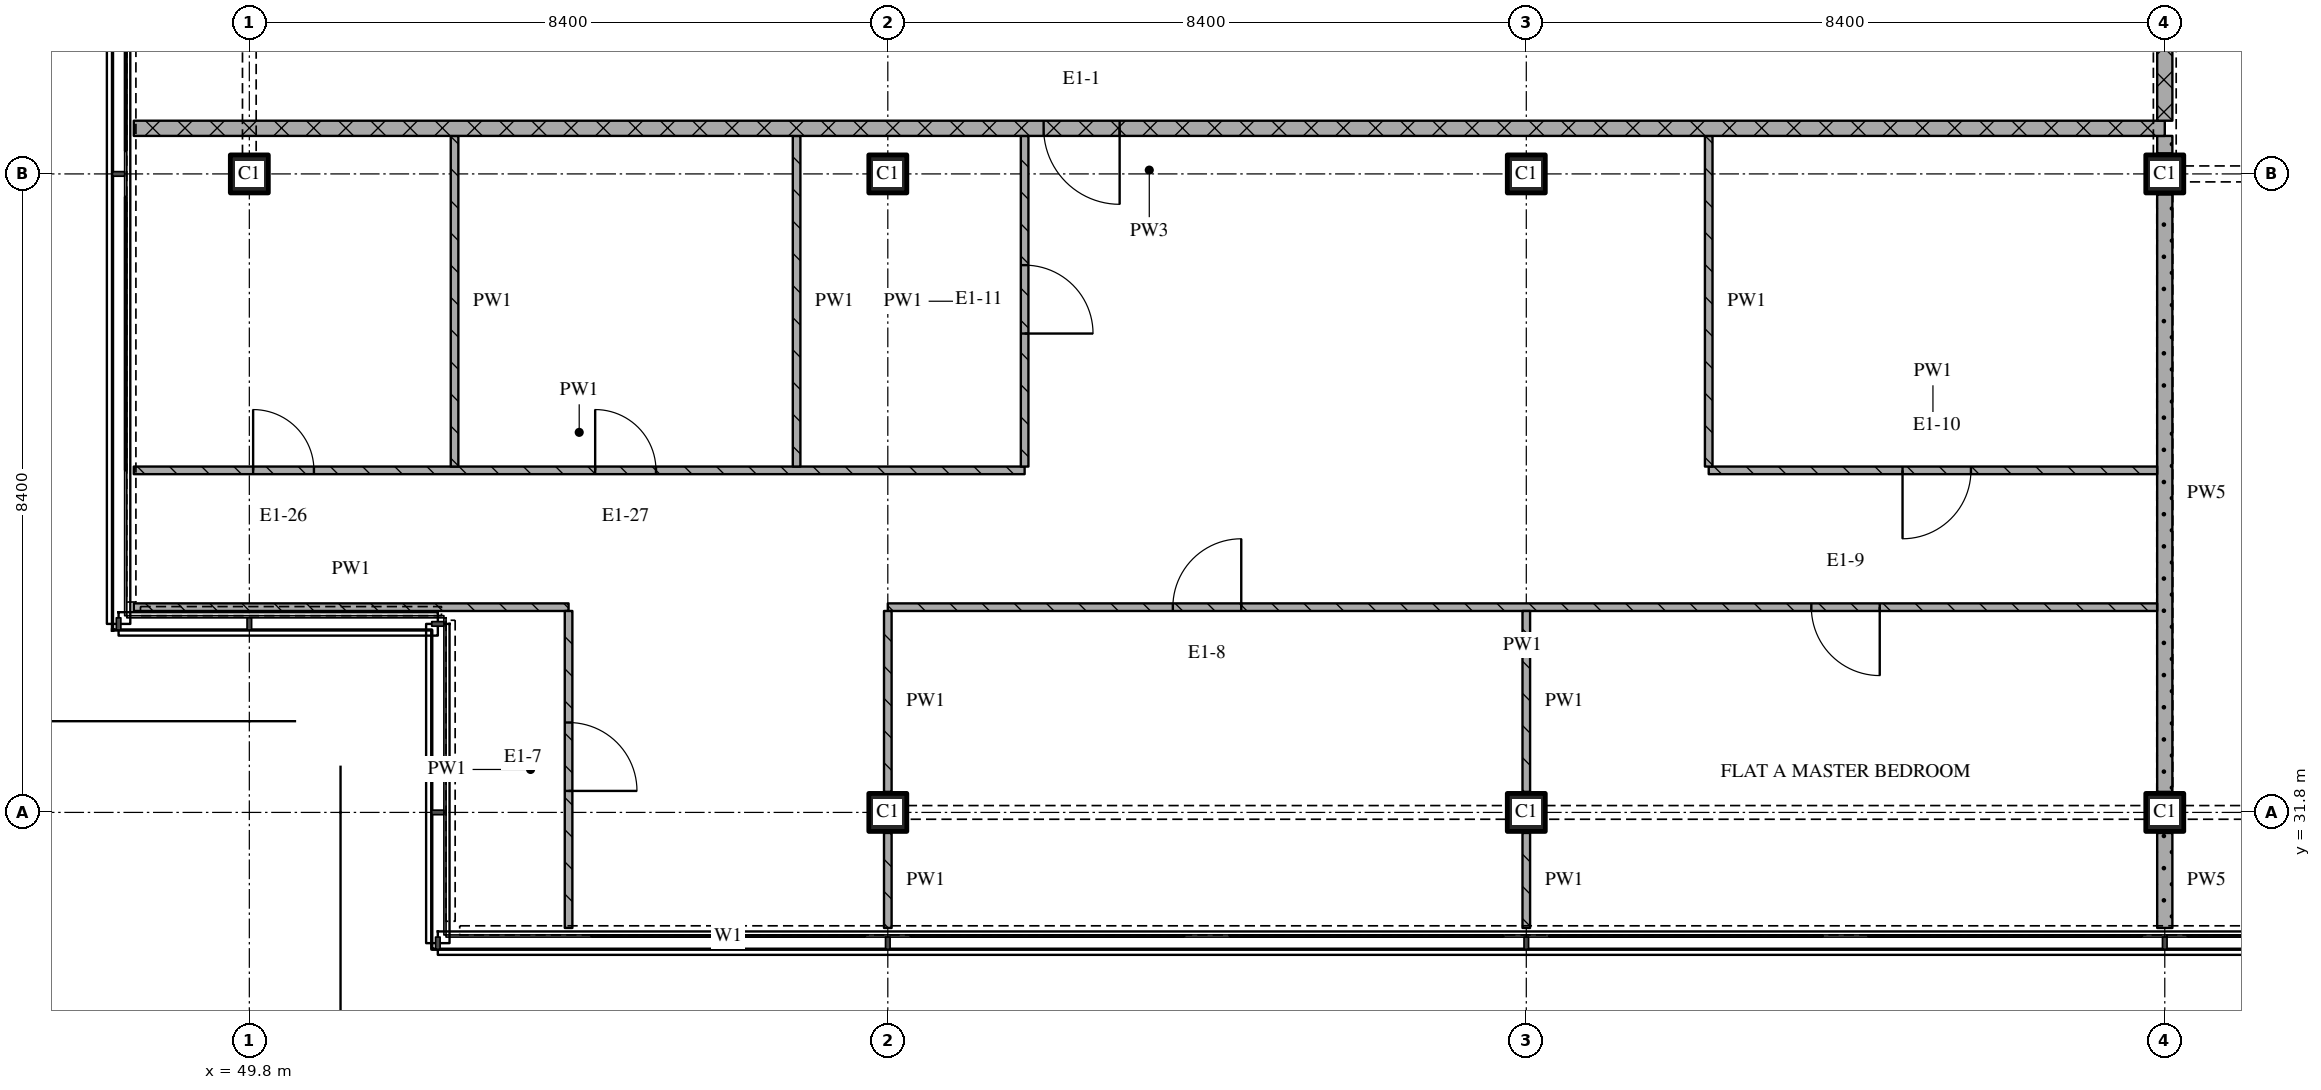
"""IFC4 building model, lengths in metres.
Left out: names, types, materials, properties, quantities, classifications, styles, units other than length and angle.
Written with IfcOpenShell. Run it as: python <this file> out.ifc"""

import sys

from ifc_helpers import new_model, si_unit, direction, frame, frame_2d, origin, origin_2d, place, context, subcontext, project, spatial, rectangle, extrude, element, fill, save


model = new_model("IFC4")
c1 = context("Model", 3, precision=1e-05, world=origin(), true_north=direction((0.0, 1.0)))
c2 = subcontext(c1, "Body", "Model", "MODEL_VIEW")
j1 = project(units=[si_unit("LENGTHUNIT", "METRE"), si_unit("PLANEANGLEUNIT", "RADIAN")], contexts=[c1])
p1 = place(None, origin())
s1 = spatial("IfcSite", under=j1, at=p1, CompositionType="ELEMENT")
p2 = place(p1, origin())
s2 = spatial("IfcBuilding", under=s1, at=p2, CompositionType="ELEMENT")
p3 = place(p2, frame((0.0, 0.0, 267.15)))
s3 = spatial("IfcBuildingStorey", under=s2, at=p3, CompositionType="ELEMENT", Elevation=267.15)
for number, where, z_axis, x_axis in (
    (1, (49.8, 40.2, 0.0), (0.0, 0.0, 1.0), (1.0, 0.0, 0.0)),
    (2, (58.2, 31.8, 0.0), (0.0, 0.0, 1.0), (1.0, 0.0, 0.0)),
    (3, (58.2, 40.2, 0.0), (0.0, 0.0, 1.0), (1.0, 0.0, 0.0)),
    (4, (66.6, 31.8, 0.0), (0.0, 0.0, 1.0), (1.0, 0.0, 0.0)),
    (5, (66.6, 40.2, 0.0), (0.0, 0.0, 1.0), (1.0, 0.0, 0.0)),
    (6, (75.0, 31.8, 0.0), (0.0, 0.0, 1.0), (1.0, 0.0, 0.0)),
    (7, (75.0, 40.2, 0.0), (0.0, 0.0, 1.0), (1.0, 0.0, 0.0)),
):
    element("IfcColumn", number, at=place(p3, frame(where, z_axis=z_axis, x_axis=x_axis)), inside=s3, PredefinedType="COLUMN", context=c2, shape_type="SweptSolid", body=[
        extrude(rectangle(XDim=0.5, YDim=0.5, at=origin_2d()), origin(), (0.0, 0.0, 1.0), 3.6),
    ])
p4 = place(p3, frame((48.28, 34.5, 0.0), z_axis=(0.0, 0.0, 1.0), x_axis=(1.0, 0.0, 0.0)))
e8 = element("IfcWall", 8, at=p4, inside=s3, PredefinedType="PARTITIONING", context=c2, shape_type="SweptSolid", body=[
    extrude(rectangle(XDim=5.72, YDim=0.1, at=frame_2d((2.86, 0.0))), origin(), (0.0, 0.0, 1.0), 3.32),
])
p5 = place(p3, frame((74.9, 34.5, 0.0), z_axis=(0.0, 0.0, 1.0), x_axis=(-1.0, 0.0, 0.0)))
e9 = element("IfcWall", 9, at=p5, inside=s3, PredefinedType="PARTITIONING", context=c2, shape_type="SweptSolid", body=[
    extrude(rectangle(XDim=16.7, YDim=0.1, at=frame_2d((8.35, 0.0))), origin(), (0.0, 0.0, 1.0), 3.32),
])
p6 = place(p5, frame((3.65, 0.0, 0.0)))
e10 = element("IfcOpeningElement", 10, at=p6, cuts=e9, PredefinedType="OPENING", context=c2, shape_type="SweptSolid", body=[
    extrude(rectangle(XDim=0.9, YDim=2.1, at=frame_2d((0.45, 1.05))), frame((0.0, 0.06, 0.0), z_axis=(0.0, -1.0, 0.0), x_axis=(1.0, 0.0, 0.0)), (0.0, 0.0, 1.0), 0.12),
])
p7 = place(p5, frame((12.05, 0.0, 0.0)))
e11 = element("IfcOpeningElement", 11, at=p7, cuts=e9, PredefinedType="OPENING", context=c2, shape_type="SweptSolid", body=[
    extrude(rectangle(XDim=0.9, YDim=2.1, at=frame_2d((0.45, 1.05))), frame((0.0, 0.06, 0.0), z_axis=(0.0, -1.0, 0.0), x_axis=(1.0, 0.0, 0.0)), (0.0, 0.0, 1.0), 0.12),
])
p8 = place(p3, frame((48.28, 36.3, 0.0), z_axis=(0.0, 0.0, 1.0), x_axis=(1.0, 0.0, 0.0)))
e12 = element("IfcWall", 12, at=p8, inside=s3, PredefinedType="PARTITIONING", context=c2, shape_type="SweptSolid", body=[
    extrude(rectangle(XDim=11.72, YDim=0.1, at=frame_2d((5.86, 0.0))), origin(), (0.0, 0.0, 1.0), 3.32),
])
p9 = place(p8, frame((1.57, 0.0, 0.0)))
e13 = element("IfcOpeningElement", 13, at=p9, cuts=e12, PredefinedType="OPENING", context=c2, shape_type="SweptSolid", body=[
    extrude(rectangle(XDim=0.8, YDim=2.1, at=frame_2d((0.4, 1.05))), frame((0.0, 0.06, 0.0), z_axis=(0.0, -1.0, 0.0), x_axis=(1.0, 0.0, 0.0)), (0.0, 0.0, 1.0), 0.12),
])
p10 = place(p8, frame((6.07, 0.0, 0.0)))
e14 = element("IfcOpeningElement", 14, at=p10, cuts=e12, PredefinedType="OPENING", context=c2, shape_type="SweptSolid", body=[
    extrude(rectangle(XDim=0.8, YDim=2.1, at=frame_2d((0.4, 1.05))), frame((0.0, 0.06, 0.0), z_axis=(0.0, -1.0, 0.0), x_axis=(1.0, 0.0, 0.0)), (0.0, 0.0, 1.0), 0.12),
])
p11 = place(p3, frame((69.0, 36.3, 0.0), z_axis=(0.0, 0.0, 1.0), x_axis=(1.0, 0.0, 0.0)))
e15 = element("IfcWall", 15, at=p11, inside=s3, PredefinedType="PARTITIONING", context=c2, shape_type="SweptSolid", body=[
    extrude(rectangle(XDim=5.9, YDim=0.1, at=frame_2d((2.95, 0.0))), origin(), (0.0, 0.0, 1.0), 3.32),
])
p12 = place(p11, frame((2.55, 0.0, 0.0)))
e16 = element("IfcOpeningElement", 16, at=p12, cuts=e15, PredefinedType="OPENING", context=c2, shape_type="SweptSolid", body=[
    extrude(rectangle(XDim=0.9, YDim=2.1, at=frame_2d((0.45, 1.05))), frame((0.0, 0.06, 0.0), z_axis=(0.0, -1.0, 0.0), x_axis=(1.0, 0.0, 0.0)), (0.0, 0.0, 1.0), 0.12),
])
p13 = place(p3, frame((75.0, 40.8, 0.0), z_axis=(0.0, 0.0, 1.0), x_axis=(-1.0, 0.0, 0.0)))
e17 = element("IfcWall", 17, at=p13, inside=s3, PredefinedType="PARTITIONING", context=c2, shape_type="SweptSolid", body=[
    extrude(rectangle(XDim=26.72, YDim=0.2, at=frame_2d((13.36, 0.0))), origin(), (0.0, 0.0, 1.0), 3.32),
])
p14 = place(p13, frame((13.75, 0.0, 0.0)))
e18 = element("IfcOpeningElement", 18, at=p14, cuts=e17, PredefinedType="OPENING", context=c2, shape_type="SweptSolid", body=[
    extrude(rectangle(XDim=1.0, YDim=2.1, at=frame_2d((0.5, 1.05))), frame((0.0, 0.11, 0.0), z_axis=(0.0, -1.0, 0.0), x_axis=(1.0, 0.0, 0.0)), (0.0, 0.0, 1.0), 0.22),
])
p15 = place(p3, frame((52.5, 40.7, 0.0), z_axis=(0.0, 0.0, 1.0), x_axis=(0.0, -1.0, 0.0)))
e19 = element("IfcWall", 19, at=p15, inside=s3, PredefinedType="PARTITIONING", context=c2, shape_type="SweptSolid", body=[
    extrude(rectangle(XDim=4.35, YDim=0.1, at=frame_2d((2.175, 0.0))), origin(), (0.0, 0.0, 1.0), 3.32),
])
p16 = place(p3, frame((54.0, 30.28, 0.0), z_axis=(0.0, 0.0, 1.0), x_axis=(0.0, 1.0, 0.0)))
e20 = element("IfcWall", 20, at=p16, inside=s3, PredefinedType="PARTITIONING", context=c2, shape_type="SweptSolid", body=[
    extrude(rectangle(XDim=4.17, YDim=0.1, at=frame_2d((2.085, 0.0))), origin(), (0.0, 0.0, 1.0), 3.32),
])
p17 = place(p16, frame((1.803, 0.0, 0.0)))
e21 = element("IfcOpeningElement", 21, at=p17, cuts=e20, PredefinedType="OPENING", context=c2, shape_type="SweptSolid", body=[
    extrude(rectangle(XDim=0.9, YDim=2.1, at=frame_2d((0.45, 1.05))), frame((0.0, 0.06, 0.0), z_axis=(0.0, -1.0, 0.0), x_axis=(1.0, 0.0, 0.0)), (0.0, 0.0, 1.0), 0.12),
])
p18 = place(p3, frame((57.0, 40.7, 0.0), z_axis=(0.0, 0.0, 1.0), x_axis=(0.0, -1.0, 0.0)))
e22 = element("IfcWall", 22, at=p18, inside=s3, PredefinedType="PARTITIONING", context=c2, shape_type="SweptSolid", body=[
    extrude(rectangle(XDim=4.35, YDim=0.1, at=frame_2d((2.175, 0.0))), origin(), (0.0, 0.0, 1.0), 3.32),
])
p19 = place(p3, frame((58.2, 31.53, 0.0), z_axis=(0.0, 0.0, 1.0), x_axis=(0.0, -1.0, 0.0)))
e23 = element("IfcWall", 23, at=p19, inside=s3, PredefinedType="PARTITIONING", context=c2, shape_type="SweptSolid", body=[
    extrude(rectangle(XDim=1.25, YDim=0.1, at=frame_2d((0.625, 0.0))), origin(), (0.0, 0.0, 1.0), 3.32),
])
p20 = place(p3, frame((58.2, 34.45, 0.0), z_axis=(0.0, 0.0, 1.0), x_axis=(0.0, -1.0, 0.0)))
e24 = element("IfcWall", 24, at=p20, inside=s3, PredefinedType="PARTITIONING", context=c2, shape_type="SweptSolid", body=[
    extrude(rectangle(XDim=2.38, YDim=0.1, at=frame_2d((1.19, 0.0))), origin(), (0.0, 0.0, 1.0), 2.83),
])
p21 = place(p3, frame((60.0, 36.35, 0.0), z_axis=(0.0, 0.0, 1.0), x_axis=(0.0, 1.0, 0.0)))
e25 = element("IfcWall", 25, at=p21, inside=s3, PredefinedType="PARTITIONING", context=c2, shape_type="SweptSolid", body=[
    extrude(rectangle(XDim=4.35, YDim=0.1, at=frame_2d((2.175, 0.0))), origin(), (0.0, 0.0, 1.0), 3.32),
])
p22 = place(p21, frame((1.75, 0.0, 0.0)))
e26 = element("IfcOpeningElement", 26, at=p22, cuts=e25, PredefinedType="OPENING", context=c2, shape_type="SweptSolid", body=[
    extrude(rectangle(XDim=0.9, YDim=2.1, at=frame_2d((0.45, 1.05))), frame((0.0, 0.06, 0.0), z_axis=(0.0, -1.0, 0.0), x_axis=(1.0, 0.0, 0.0)), (0.0, 0.0, 1.0), 0.12),
])
p23 = place(p3, frame((66.6, 31.53, 0.0), z_axis=(0.0, 0.0, 1.0), x_axis=(0.0, -1.0, 0.0)))
e27 = element("IfcWall", 27, at=p23, inside=s3, PredefinedType="PARTITIONING", context=c2, shape_type="SweptSolid", body=[
    extrude(rectangle(XDim=1.25, YDim=0.1, at=frame_2d((0.625, 0.0))), origin(), (0.0, 0.0, 1.0), 3.32),
])
p24 = place(p3, frame((66.6, 34.45, 0.0), z_axis=(0.0, 0.0, 1.0), x_axis=(0.0, -1.0, 0.0)))
e28 = element("IfcWall", 28, at=p24, inside=s3, PredefinedType="PARTITIONING", context=c2, shape_type="SweptSolid", body=[
    extrude(rectangle(XDim=2.38, YDim=0.1, at=frame_2d((1.19, 0.0))), origin(), (0.0, 0.0, 1.0), 3.32),
])
p25 = place(p3, frame((69.0, 40.7, 0.0), z_axis=(0.0, 0.0, 1.0), x_axis=(0.0, -1.0, 0.0)))
e29 = element("IfcWall", 29, at=p25, inside=s3, PredefinedType="PARTITIONING", context=c2, shape_type="SweptSolid", body=[
    extrude(rectangle(XDim=4.35, YDim=0.1, at=frame_2d((2.175, 0.0))), origin(), (0.0, 0.0, 1.0), 3.32),
])
p26 = place(p3, frame((75.0, 43.1, 0.0), z_axis=(0.0, 0.0, 1.0), x_axis=(0.0, -1.0, 0.0)))
e30 = element("IfcWall", 30, at=p26, inside=s3, PredefinedType="PARTITIONING", context=c2, shape_type="SweptSolid", body=[
    extrude(rectangle(XDim=2.2, YDim=0.2, at=frame_2d((1.1, 0.0))), origin(), (0.0, 0.0, 1.0), 2.53),
])
p27 = place(p3, frame((75.0, 31.53, 0.0), z_axis=(0.0, 0.0, 1.0), x_axis=(0.0, -1.0, 0.0)))
e31 = element("IfcWall", 31, at=p27, inside=s3, PredefinedType="PARTITIONING", context=c2, shape_type="SweptSolid", body=[
    extrude(rectangle(XDim=1.25, YDim=0.2, at=frame_2d((0.625, 0.0))), origin(), (0.0, 0.0, 1.0), 3.32),
])
p28 = place(p3, frame((75.0, 39.93, 0.0), z_axis=(0.0, 0.0, 1.0), x_axis=(0.0, -1.0, 0.0)))
e32 = element("IfcWall", 32, at=p28, inside=s3, PredefinedType="PARTITIONING", context=c2, shape_type="SweptSolid", body=[
    extrude(rectangle(XDim=7.86, YDim=0.2, at=frame_2d((3.93, 0.0))), origin(), (0.0, 0.0, 1.0), 2.77),
])
p29 = place(p3, frame((75.0, 40.7, 0.0), z_axis=(0.0, 0.0, 1.0), x_axis=(0.0, -1.0, 0.0)))
e33 = element("IfcWall", 33, at=p29, inside=s3, PredefinedType="PARTITIONING", context=c2, shape_type="SweptSolid", body=[
    extrude(rectangle(XDim=0.23, YDim=0.2, at=frame_2d((0.115, 0.0))), origin(), (0.0, 0.0, 1.0), 3.32),
])
p30 = place(p6, origin())
e34 = element("IfcDoor", 34, at=p30, inside=s3, OperationType="SINGLE_SWING_LEFT", PredefinedType="DOOR", context=c2, shape_type="SweptSolid", body=[
    extrude(rectangle(XDim=0.9, YDim=2.1, at=frame_2d((0.45, 1.05))), frame((0.0, 0.025, 0.0), z_axis=(0.0, -1.0, 0.0), x_axis=(1.0, 0.0, 0.0)), (0.0, 0.0, 1.0), 0.05),
])
fill(e10, e34)
p31 = place(p7, origin())
e35 = element("IfcDoor", 35, at=p31, inside=s3, OperationType="SINGLE_SWING_RIGHT", PredefinedType="DOOR", context=c2, shape_type="SweptSolid", body=[
    extrude(rectangle(XDim=0.9, YDim=2.1, at=frame_2d((0.45, 1.05))), frame((0.0, 0.025, 0.0), z_axis=(0.0, -1.0, 0.0), x_axis=(1.0, 0.0, 0.0)), (0.0, 0.0, 1.0), 0.05),
])
fill(e11, e35)
p32 = place(p9, origin())
e36 = element("IfcDoor", 36, at=p32, inside=s3, OperationType="SINGLE_SWING_LEFT", PredefinedType="DOOR", context=c2, shape_type="SweptSolid", body=[
    extrude(rectangle(XDim=0.8, YDim=2.1, at=frame_2d((0.4, 1.05))), frame((0.0, 0.025, 0.0), z_axis=(0.0, -1.0, 0.0), x_axis=(1.0, 0.0, 0.0)), (0.0, 0.0, 1.0), 0.05),
])
fill(e13, e36)
p33 = place(p10, origin())
e37 = element("IfcDoor", 37, at=p33, inside=s3, OperationType="SINGLE_SWING_LEFT", PredefinedType="DOOR", context=c2, shape_type="SweptSolid", body=[
    extrude(rectangle(XDim=0.8, YDim=2.1, at=frame_2d((0.4, 1.05))), frame((0.0, 0.025, 0.0), z_axis=(0.0, -1.0, 0.0), x_axis=(1.0, 0.0, 0.0)), (0.0, 0.0, 1.0), 0.05),
])
fill(e14, e37)
p34 = place(p12, origin())
e38 = element("IfcDoor", 38, at=p34, inside=s3, OperationType="SINGLE_SWING_RIGHT", PredefinedType="DOOR", context=c2, shape_type="SweptSolid", body=[
    extrude(rectangle(XDim=0.9, YDim=2.1, at=frame_2d((0.45, 1.05))), frame((0.0, 0.025, 0.0), z_axis=(0.0, -1.0, 0.0), x_axis=(1.0, 0.0, 0.0)), (0.0, 0.0, 1.0), 0.05),
])
fill(e16, e38)
p35 = place(p14, origin())
e39 = element("IfcDoor", 39, at=p35, inside=s3, OperationType="SINGLE_SWING_LEFT", PredefinedType="DOOR", context=c2, shape_type="SweptSolid", body=[
    extrude(rectangle(XDim=1.0, YDim=2.1, at=frame_2d((0.5, 1.05))), frame((0.0, 0.025, 0.0), z_axis=(0.0, -1.0, 0.0), x_axis=(1.0, 0.0, 0.0)), (0.0, 0.0, 1.0), 0.05),
])
fill(e18, e39)
p36 = place(p17, origin())
e40 = element("IfcDoor", 40, at=p36, inside=s3, OperationType="SINGLE_SWING_RIGHT", PredefinedType="DOOR", context=c2, shape_type="SweptSolid", body=[
    extrude(rectangle(XDim=0.9, YDim=2.1, at=frame_2d((0.45, 1.05))), frame((0.0, 0.025, 0.0), z_axis=(0.0, -1.0, 0.0), x_axis=(1.0, 0.0, 0.0)), (0.0, 0.0, 1.0), 0.05),
])
fill(e21, e40)
p37 = place(p22, origin())
e41 = element("IfcDoor", 41, at=p37, inside=s3, OperationType="SINGLE_SWING_RIGHT", PredefinedType="DOOR", context=c2, shape_type="SweptSolid", body=[
    extrude(rectangle(XDim=0.9, YDim=2.1, at=frame_2d((0.45, 1.05))), frame((0.0, 0.025, 0.0), z_axis=(0.0, -1.0, 0.0), x_axis=(1.0, 0.0, 0.0)), (0.0, 0.0, 1.0), 0.05),
])
fill(e26, e41)
save(model, sys.argv[1])
